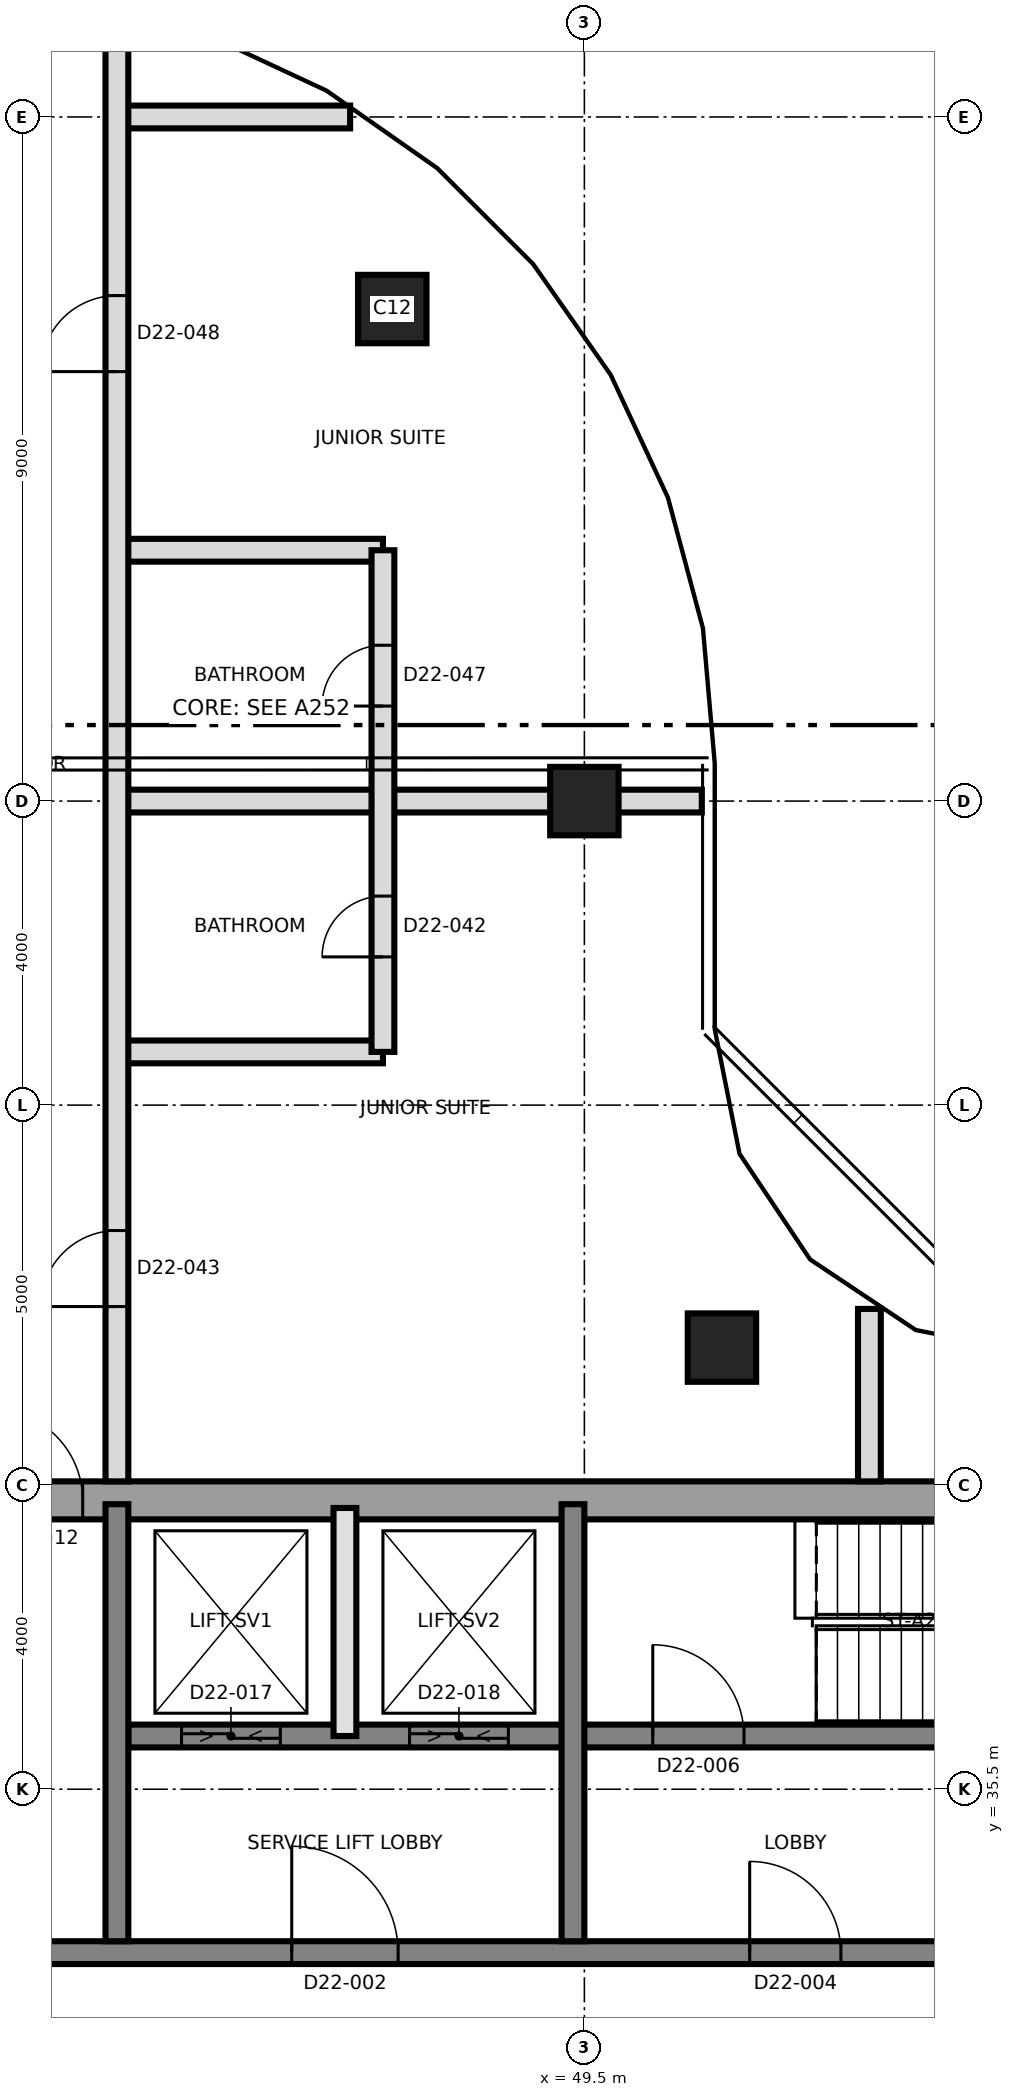
"""IFC4 building model, lengths in metres.
Left out: names, types, materials, properties, quantities, classifications, styles, units other than length and angle.
Written with IfcOpenShell. Run it as: python <this file> out.ifc"""

import sys

from ifc_helpers import new_model, si_unit, direction, frame, frame_2d, origin, origin_2d, place, context, subcontext, project, spatial, rectangle, extrude, element, fill, save


model = new_model("IFC4")
c1 = context("Model", 3, precision=1e-05, world=origin(), true_north=direction((0.0, 1.0)))
c2 = subcontext(c1, "Body", "Model", "MODEL_VIEW")
j1 = project(units=[si_unit("LENGTHUNIT", "METRE"), si_unit("PLANEANGLEUNIT", "RADIAN")], contexts=[c1])
p1 = place(None, origin())
s1 = spatial("IfcSite", under=j1, at=p1, CompositionType="ELEMENT")
p2 = place(p1, origin())
s2 = spatial("IfcBuilding", under=s1, at=p2, CompositionType="ELEMENT")
p3 = place(p2, frame((0.0, 0.0, 199.5)))
s3 = spatial("IfcBuildingStorey", under=s2, at=p3, CompositionType="ELEMENT", Elevation=199.5)
p4 = place(p3, frame((31.25, 39.3, 0.0), z_axis=(0.0, 0.0, 1.0), x_axis=(1.0, 0.0, 0.0)))
e1 = element("IfcWall", 1, at=p4, inside=s3, PredefinedType="SHEAR", context=c2, shape_type="SweptSolid", body=[
    extrude(rectangle(XDim=27.0, YDim=0.5, at=frame_2d((13.5, 0.0))), origin(), (0.0, 0.0, 1.0), 3.7),
])
p5 = place(p4, frame((10.45, 0.0, 0.0)))
e2 = element("IfcOpeningElement", 2, at=p5, cuts=e1, PredefinedType="OPENING", context=c2, shape_type="SweptSolid", body=[
    extrude(rectangle(XDim=1.2, YDim=2.1, at=frame_2d((0.6, 1.05))), frame((0.0, 0.26, 0.0), z_axis=(0.0, -1.0, 0.0), x_axis=(1.0, 0.0, 0.0)), (0.0, 0.0, 1.0), 0.52),
])
p6 = place(p3, frame((31.75, 33.35, 0.0), z_axis=(0.0, 0.0, 1.0), x_axis=(1.0, 0.0, 0.0)))
e3 = element("IfcWall", 3, at=p6, inside=s3, PredefinedType="SHEAR", context=c2, shape_type="SweptSolid", body=[
    extrude(rectangle(XDim=26.5, YDim=0.3, at=frame_2d((13.25, 0.0))), origin(), (0.0, 0.0, 1.0), 3.7),
])
p7 = place(p6, frame((13.9, 0.0, 0.0)))
e4 = element("IfcOpeningElement", 4, at=p7, cuts=e3, PredefinedType="OPENING", context=c2, shape_type="SweptSolid", body=[
    extrude(rectangle(XDim=1.4, YDim=2.1, at=frame_2d((0.7, 1.05))), frame((0.0, 0.16, 0.0), z_axis=(0.0, -1.0, 0.0), x_axis=(1.0, 0.0, 0.0)), (0.0, 0.0, 1.0), 0.32),
])
p8 = place(p6, frame((5.375, 0.0, 0.0)))
e5 = element("IfcOpeningElement", 5, at=p8, cuts=e3, PredefinedType="OPENING", context=c2, shape_type="SweptSolid", body=[
    extrude(rectangle(XDim=1.2, YDim=2.1, at=frame_2d((0.6, 1.05))), frame((0.0, 0.16, 0.0), z_axis=(0.0, -1.0, 0.0), x_axis=(1.0, 0.0, 0.0)), (0.0, 0.0, 1.0), 0.32),
])
p9 = place(p6, frame((19.925, 0.0, 0.0)))
e6 = element("IfcOpeningElement", 6, at=p9, cuts=e3, PredefinedType="OPENING", context=c2, shape_type="SweptSolid", body=[
    extrude(rectangle(XDim=1.2, YDim=2.1, at=frame_2d((0.6, 1.05))), frame((0.0, 0.16, 0.0), z_axis=(0.0, -1.0, 0.0), x_axis=(1.0, 0.0, 0.0)), (0.0, 0.0, 1.0), 0.32),
])
p10 = place(p3, frame((43.5, 36.2, 0.0), z_axis=(0.0, 0.0, 1.0), x_axis=(1.0, 0.0, 0.0)))
e7 = element("IfcWall", 7, at=p10, inside=s3, PredefinedType="SHEAR", context=c2, shape_type="SweptSolid", body=[
    extrude(rectangle(XDim=14.75, YDim=0.3, at=frame_2d((7.375, 0.0))), origin(), (0.0, 0.0, 1.0), 3.7),
])
p11 = place(p10, frame((6.9, 0.0, 0.0)))
e8 = element("IfcOpeningElement", 8, at=p11, cuts=e7, PredefinedType="OPENING", context=c2, shape_type="SweptSolid", body=[
    extrude(rectangle(XDim=1.2, YDim=2.1, at=frame_2d((0.6, 1.05))), frame((0.0, 0.16, 0.0), z_axis=(0.0, -1.0, 0.0), x_axis=(1.0, 0.0, 0.0)), (0.0, 0.0, 1.0), 0.32),
])
p12 = place(p10, frame((0.7, 0.0, 0.0)))
e9 = element("IfcOpeningElement", 9, at=p12, cuts=e7, PredefinedType="OPENING", context=c2, shape_type="SweptSolid", body=[
    extrude(rectangle(XDim=1.3, YDim=2.4, at=frame_2d((0.65, 1.2))), frame((0.0, 0.16, 0.0), z_axis=(0.0, -1.0, 0.0), x_axis=(1.0, 0.0, 0.0)), (0.0, 0.0, 1.0), 0.32),
])
p13 = place(p10, frame((3.7, 0.0, 0.0)))
e10 = element("IfcOpeningElement", 10, at=p13, cuts=e7, PredefinedType="OPENING", context=c2, shape_type="SweptSolid", body=[
    extrude(rectangle(XDim=1.3, YDim=2.4, at=frame_2d((0.65, 1.2))), frame((0.0, 0.16, 0.0), z_axis=(0.0, -1.0, 0.0), x_axis=(1.0, 0.0, 0.0)), (0.0, 0.0, 1.0), 0.32),
])
for number, where, z_axis, x_axis in (
    (11, (43.35, 33.5, 0.0), (0.0, 0.0, 1.0), (0.0, 1.0, 0.0)),
    (12, (49.35, 33.5, 0.0), (0.0, 0.0, 1.0), (0.0, 1.0, 0.0)),
):
    element("IfcWall", number, at=place(p3, frame(where, z_axis=z_axis, x_axis=x_axis)), inside=s3, PredefinedType="SHEAR", context=c2, shape_type="SweptSolid", body=[
        extrude(rectangle(XDim=5.75, YDim=0.3, at=frame_2d((2.875, 0.0))), origin(), (0.0, 0.0, 1.0), 3.7),
    ])
for number, where, z_axis, x_axis in (
    (13, (51.31, 41.31, 0.0), (0.0, 0.0, 1.0), (1.0, 0.0, 0.0)),
    (14, (49.5, 48.5, 0.0), (0.0, 0.0, 1.0), (1.0, 0.0, 0.0)),
    (15, (46.973, 54.973, 0.0), (0.0, 0.0, 1.0), (1.0, 0.0, 0.0)),
):
    element("IfcColumn", number, at=place(p3, frame(where, z_axis=z_axis, x_axis=x_axis)), inside=s3, PredefinedType="COLUMN", context=c2, shape_type="SweptSolid", body=[
        extrude(rectangle(XDim=0.9, YDim=0.9, at=origin_2d()), origin(), (0.0, 0.0, 1.0), 3.7),
    ])
p14 = place(p3, frame((46.35, 36.2, 0.0), z_axis=(0.0, 0.0, 1.0), x_axis=(0.0, 1.0, 0.0)))
e16 = element("IfcWall", 16, at=p14, inside=s3, PredefinedType="SOLIDWALL", context=c2, shape_type="SweptSolid", body=[
    extrude(rectangle(XDim=3.0, YDim=0.3, at=frame_2d((1.5, 0.0))), origin(), (0.0, 0.0, 1.0), 3.4),
])
p15 = place(p3, frame((43.35, 45.2, 0.0), z_axis=(0.0, 0.0, 1.0), x_axis=(1.0, 0.0, 0.0)))
e17 = element("IfcWall", 17, at=p15, inside=s3, PredefinedType="PARTITIONING", context=c2, shape_type="SweptSolid", body=[
    extrude(rectangle(XDim=3.5, YDim=0.3, at=frame_2d((1.75, 0.0))), origin(), (0.0, 0.0, 1.0), 3.4),
])
p16 = place(p3, frame((43.35, 48.5, 0.0), z_axis=(0.0, 0.0, 1.0), x_axis=(1.0, 0.0, 0.0)))
e18 = element("IfcWall", 18, at=p16, inside=s3, PredefinedType="PARTITIONING", context=c2, shape_type="SweptSolid", body=[
    extrude(rectangle(XDim=7.695, YDim=0.3, at=frame_2d((3.847, 0.0))), origin(), (0.0, 0.0, 1.0), 3.4),
])
p17 = place(p3, frame((43.35, 51.8, 0.0), z_axis=(0.0, 0.0, 1.0), x_axis=(1.0, 0.0, 0.0)))
e19 = element("IfcWall", 19, at=p17, inside=s3, PredefinedType="PARTITIONING", context=c2, shape_type="SweptSolid", body=[
    extrude(rectangle(XDim=3.5, YDim=0.3, at=frame_2d((1.75, 0.0))), origin(), (0.0, 0.0, 1.0), 3.4),
])
p18 = place(p3, frame((43.35, 57.5, 0.0), z_axis=(0.0, 0.0, 1.0), x_axis=(1.0, 0.0, 0.0)))
e20 = element("IfcWall", 20, at=p18, inside=s3, PredefinedType="PARTITIONING", context=c2, shape_type="SweptSolid", body=[
    extrude(rectangle(XDim=3.068, YDim=0.3, at=frame_2d((1.534, 0.0))), origin(), (0.0, 0.0, 1.0), 3.4),
])
p19 = place(p3, frame((43.35, 39.55, 0.0), z_axis=(0.0, 0.0, 1.0), x_axis=(0.0, 1.0, 0.0)))
e21 = element("IfcWall", 21, at=p19, inside=s3, PredefinedType="PARTITIONING", context=c2, shape_type="SweptSolid", body=[
    extrude(rectangle(XDim=18.993, YDim=0.3, at=frame_2d((9.497, 0.0))), origin(), (0.0, 0.0, 1.0), 3.4),
])
p20 = place(p19, frame((2.3, 0.0, 0.0)))
e22 = element("IfcOpeningElement", 22, at=p20, cuts=e21, PredefinedType="OPENING", context=c2, shape_type="SweptSolid", body=[
    extrude(rectangle(XDim=1.0, YDim=2.4, at=frame_2d((0.5, 1.2))), frame((0.0, 0.16, 0.0), z_axis=(0.0, -1.0, 0.0), x_axis=(1.0, 0.0, 0.0)), (0.0, 0.0, 1.0), 0.32),
])
p21 = place(p19, frame((14.6, 0.0, 0.0)))
e23 = element("IfcOpeningElement", 23, at=p21, cuts=e21, PredefinedType="OPENING", context=c2, shape_type="SweptSolid", body=[
    extrude(rectangle(XDim=1.0, YDim=2.4, at=frame_2d((0.5, 1.2))), frame((0.0, 0.16, 0.0), z_axis=(0.0, -1.0, 0.0), x_axis=(1.0, 0.0, 0.0)), (0.0, 0.0, 1.0), 0.32),
])
p22 = place(p3, frame((46.85, 45.2, 0.0), z_axis=(0.0, 0.0, 1.0), x_axis=(0.0, 1.0, 0.0)))
e24 = element("IfcWall", 24, at=p22, inside=s3, PredefinedType="PARTITIONING", context=c2, shape_type="SweptSolid", body=[
    extrude(rectangle(XDim=6.6, YDim=0.3, at=frame_2d((3.3, 0.0))), origin(), (0.0, 0.0, 1.0), 3.4),
])
p23 = place(p22, frame((1.25, 0.0, 0.0)))
e25 = element("IfcOpeningElement", 25, at=p23, cuts=e24, PredefinedType="OPENING", context=c2, shape_type="SweptSolid", body=[
    extrude(rectangle(XDim=0.8, YDim=2.1, at=frame_2d((0.4, 1.05))), frame((0.0, 0.16, 0.0), z_axis=(0.0, -1.0, 0.0), x_axis=(1.0, 0.0, 0.0)), (0.0, 0.0, 1.0), 0.32),
])
p24 = place(p22, frame((4.55, 0.0, 0.0)))
e26 = element("IfcOpeningElement", 26, at=p24, cuts=e24, PredefinedType="OPENING", context=c2, shape_type="SweptSolid", body=[
    extrude(rectangle(XDim=0.8, YDim=2.1, at=frame_2d((0.4, 1.05))), frame((0.0, 0.16, 0.0), z_axis=(0.0, -1.0, 0.0), x_axis=(1.0, 0.0, 0.0)), (0.0, 0.0, 1.0), 0.32),
])
p25 = place(p3, frame((53.25, 39.55, 0.0), z_axis=(0.0, 0.0, 1.0), x_axis=(0.0, 1.0, 0.0)))
e27 = element("IfcWall", 27, at=p25, inside=s3, PredefinedType="PARTITIONING", context=c2, shape_type="SweptSolid", body=[
    extrude(rectangle(XDim=2.269, YDim=0.3, at=frame_2d((1.135, 0.0))), origin(), (0.0, 0.0, 1.0), 3.4),
])
p26 = place(p7, origin())
e28 = element("IfcDoor", 28, at=p26, inside=s3, OperationType="SINGLE_SWING_RIGHT", PredefinedType="DOOR", context=c2, shape_type="SweptSolid", body=[
    extrude(rectangle(XDim=1.4, YDim=2.1, at=frame_2d((0.7, 1.05))), frame((0.0, 0.025, 0.0), z_axis=(0.0, -1.0, 0.0), x_axis=(1.0, 0.0, 0.0)), (0.0, 0.0, 1.0), 0.05),
])
fill(e4, e28)
p27 = place(p9, origin())
e29 = element("IfcDoor", 29, at=p27, inside=s3, OperationType="SINGLE_SWING_RIGHT", PredefinedType="DOOR", context=c2, shape_type="SweptSolid", body=[
    extrude(rectangle(XDim=1.2, YDim=2.1, at=frame_2d((0.6, 1.05))), frame((0.0, 0.025, 0.0), z_axis=(0.0, -1.0, 0.0), x_axis=(1.0, 0.0, 0.0)), (0.0, 0.0, 1.0), 0.05),
])
fill(e6, e29)
p28 = place(p11, origin())
e30 = element("IfcDoor", 30, at=p28, inside=s3, OperationType="SINGLE_SWING_LEFT", PredefinedType="DOOR", context=c2, shape_type="SweptSolid", body=[
    extrude(rectangle(XDim=1.2, YDim=2.1, at=frame_2d((0.6, 1.05))), frame((0.0, 0.025, 0.0), z_axis=(0.0, -1.0, 0.0), x_axis=(1.0, 0.0, 0.0)), (0.0, 0.0, 1.0), 0.05),
])
fill(e8, e30)
p29 = place(p5, origin())
e31 = element("IfcDoor", 31, at=p29, inside=s3, OperationType="SINGLE_SWING_RIGHT", PredefinedType="DOOR", context=c2, shape_type="SweptSolid", body=[
    extrude(rectangle(XDim=1.2, YDim=2.1, at=frame_2d((0.6, 1.05))), frame((0.0, 0.025, 0.0), z_axis=(0.0, -1.0, 0.0), x_axis=(1.0, 0.0, 0.0)), (0.0, 0.0, 1.0), 0.05),
])
fill(e2, e31)
p30 = place(p12, origin())
e32 = element("IfcDoor", 32, at=p30, inside=s3, OperationType="SLIDING_TO_LEFT", PredefinedType="DOOR", context=c2, shape_type="SweptSolid", body=[
    extrude(rectangle(XDim=1.3, YDim=2.4, at=frame_2d((0.65, 1.2))), frame((0.0, 0.025, 0.0), z_axis=(0.0, -1.0, 0.0), x_axis=(1.0, 0.0, 0.0)), (0.0, 0.0, 1.0), 0.05),
])
fill(e9, e32)
p31 = place(p13, origin())
e33 = element("IfcDoor", 33, at=p31, inside=s3, OperationType="SLIDING_TO_LEFT", PredefinedType="DOOR", context=c2, shape_type="SweptSolid", body=[
    extrude(rectangle(XDim=1.3, YDim=2.4, at=frame_2d((0.65, 1.2))), frame((0.0, 0.025, 0.0), z_axis=(0.0, -1.0, 0.0), x_axis=(1.0, 0.0, 0.0)), (0.0, 0.0, 1.0), 0.05),
])
fill(e10, e33)
p32 = place(p23, origin())
e34 = element("IfcDoor", 34, at=p32, inside=s3, OperationType="SINGLE_SWING_RIGHT", PredefinedType="DOOR", context=c2, shape_type="SweptSolid", body=[
    extrude(rectangle(XDim=0.8, YDim=2.1, at=frame_2d((0.4, 1.05))), frame((0.0, 0.025, 0.0), z_axis=(0.0, -1.0, 0.0), x_axis=(1.0, 0.0, 0.0)), (0.0, 0.0, 1.0), 0.05),
])
fill(e25, e34)
p33 = place(p20, origin())
e35 = element("IfcDoor", 35, at=p33, inside=s3, OperationType="SINGLE_SWING_LEFT", PredefinedType="DOOR", context=c2, shape_type="SweptSolid", body=[
    extrude(rectangle(XDim=1.0, YDim=2.4, at=frame_2d((0.5, 1.2))), frame((0.0, 0.025, 0.0), z_axis=(0.0, -1.0, 0.0), x_axis=(1.0, 0.0, 0.0)), (0.0, 0.0, 1.0), 0.05),
])
fill(e22, e35)
p34 = place(p24, origin())
e36 = element("IfcDoor", 36, at=p34, inside=s3, OperationType="SINGLE_SWING_LEFT", PredefinedType="DOOR", context=c2, shape_type="SweptSolid", body=[
    extrude(rectangle(XDim=0.8, YDim=2.1, at=frame_2d((0.4, 1.05))), frame((0.0, 0.025, 0.0), z_axis=(0.0, -1.0, 0.0), x_axis=(1.0, 0.0, 0.0)), (0.0, 0.0, 1.0), 0.05),
])
fill(e26, e36)
p35 = place(p21, origin())
e37 = element("IfcDoor", 37, at=p35, inside=s3, OperationType="SINGLE_SWING_LEFT", PredefinedType="DOOR", context=c2, shape_type="SweptSolid", body=[
    extrude(rectangle(XDim=1.0, YDim=2.4, at=frame_2d((0.5, 1.2))), frame((0.0, 0.025, 0.0), z_axis=(0.0, -1.0, 0.0), x_axis=(1.0, 0.0, 0.0)), (0.0, 0.0, 1.0), 0.05),
])
fill(e23, e37)
save(model, sys.argv[1])
